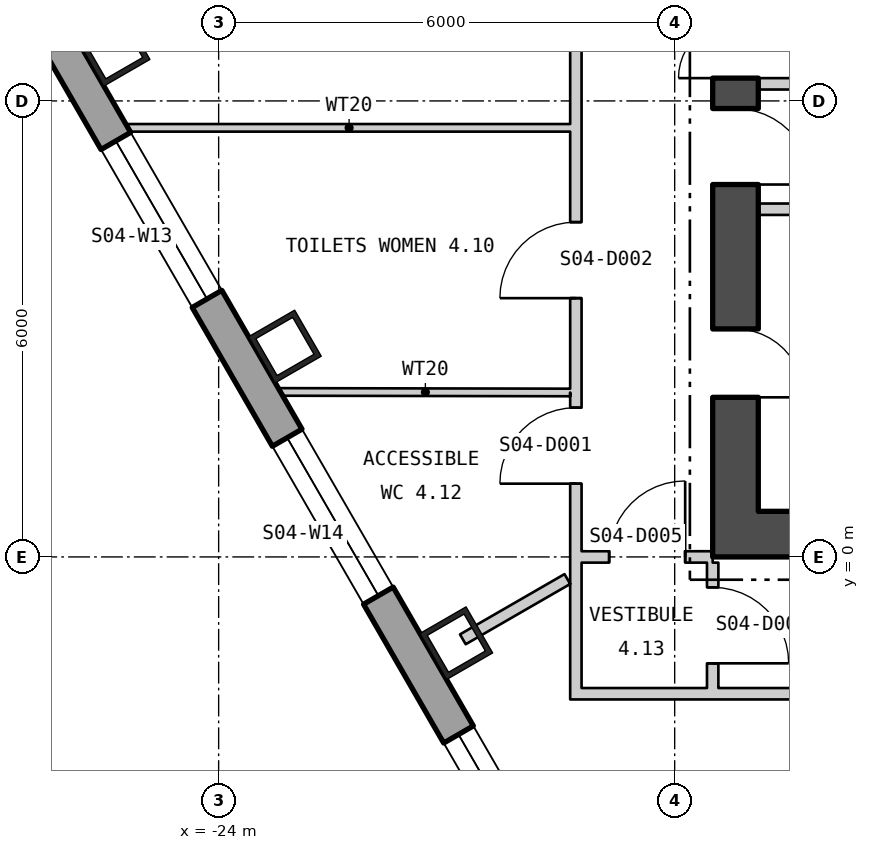
"""IFC4 building model, lengths in metres.
Left out: names, types, materials, properties, quantities, classifications, styles, units other than length and angle.
Written with IfcOpenShell. Run it as: python <this file> out.ifc"""

import sys

from ifc_helpers import new_model, si_unit, direction, frame, frame_2d, origin, origin_2d, place, context, subcontext, project, spatial, polyline, rectangle, hollow_rectangle, outline, extrude, element, fill, save


model = new_model("IFC4")
c1 = context("Model", 3, precision=1e-05, world=origin(), true_north=direction((0.0, 1.0)))
c2 = subcontext(c1, "Body", "Model", "MODEL_VIEW")
j1 = project(units=[si_unit("LENGTHUNIT", "METRE"), si_unit("PLANEANGLEUNIT", "RADIAN")], contexts=[c1])
p1 = place(None, origin())
s1 = spatial("IfcSite", under=j1, at=p1, CompositionType="ELEMENT")
p2 = place(p1, origin())
s2 = spatial("IfcBuilding", under=s1, at=p2, CompositionType="ELEMENT")
p3 = place(p2, frame((0.0, 0.0, 60.3)))
s3 = spatial("IfcBuildingStorey", under=s2, at=p3, CompositionType="ELEMENT", Elevation=60.3)
for number, where, z_axis, x_axis in (
    (1, (-25.382, 6.674, 0.0), (0.0, 0.0, 1.0), (0.5, -0.866, 0.0)),
    (2, (-23.128, 2.769, 0.0), (0.0, 0.0, 1.0), (0.5, -0.866, 0.0)),
    (3, (-20.873, -1.135, 0.0), (0.0, 0.0, 1.0), (0.5, -0.866, 0.0)),
):
    element("IfcColumn", number, at=place(p3, frame(where, z_axis=z_axis, x_axis=x_axis)), inside=s3, PredefinedType="COLUMN", context=c2, shape_type="SweptSolid", body=[
        extrude(hollow_rectangle(XDim=0.7, YDim=0.7, WallThickness=0.07, at=origin_2d()), origin(), (0.0, 0.0, 1.0), 4.5),
    ])
p4 = place(p3, frame((-28.3, 10.579, -0.18), z_axis=(0.0, 0.0, 1.0), x_axis=(0.499999388847, -0.866025756634, 0.0)))
e4 = element("IfcWall", 4, at=p4, inside=s3, PredefinedType="SOLIDWALL", context=c2, shape_type="SweptSolid", body=[
    extrude(outline(polyline([(-0.13, -0.225), (45.88, -0.225), (45.62, 0.225), (0.13, 0.225), (-0.13, -0.225)])), origin(), (0.0, 0.0, 1.0), 4.28),
])
p5 = place(p4, frame((1.425, 0.0, 1.08)))
e5 = element("IfcOpeningElement", 5, at=p5, cuts=e4, PredefinedType="OPENING", context=c2, shape_type="SweptSolid", body=[
    extrude(rectangle(XDim=2.4, YDim=2.6, at=frame_2d((1.2, 1.3))), frame((0.0, 0.235, 0.0), z_axis=(0.0, -1.0, 0.0), x_axis=(1.0, 0.0, 0.0)), (0.0, 0.0, 1.0), 0.47),
])
p6 = place(p4, frame((5.895, 0.0, 1.08)))
e6 = element("IfcOpeningElement", 6, at=p6, cuts=e4, PredefinedType="OPENING", context=c2, shape_type="SweptSolid", body=[
    extrude(rectangle(XDim=2.4, YDim=2.6, at=frame_2d((1.2, 1.3))), frame((0.0, 0.235, 0.0), z_axis=(0.0, -1.0, 0.0), x_axis=(1.0, 0.0, 0.0)), (0.0, 0.0, 1.0), 0.47),
])
p7 = place(p4, frame((10.403, 0.0, 1.08)))
e7 = element("IfcOpeningElement", 7, at=p7, cuts=e4, PredefinedType="OPENING", context=c2, shape_type="SweptSolid", body=[
    extrude(rectangle(XDim=2.4, YDim=2.6, at=frame_2d((1.2, 1.3))), frame((0.0, 0.235, 0.0), z_axis=(0.0, -1.0, 0.0), x_axis=(1.0, 0.0, 0.0)), (0.0, 0.0, 1.0), 0.47),
])
p8 = place(p4, frame((14.912, 0.0, 1.08)))
e8 = element("IfcOpeningElement", 8, at=p8, cuts=e4, PredefinedType="OPENING", context=c2, shape_type="SweptSolid", body=[
    extrude(rectangle(XDim=2.4, YDim=2.6, at=frame_2d((1.2, 1.3))), frame((0.0, 0.235, 0.0), z_axis=(0.0, -1.0, 0.0), x_axis=(1.0, 0.0, 0.0)), (0.0, 0.0, 1.0), 0.47),
])
p9 = place(p4, frame((19.421, 0.0, 1.08)))
e9 = element("IfcOpeningElement", 9, at=p9, cuts=e4, PredefinedType="OPENING", context=c2, shape_type="SweptSolid", body=[
    extrude(rectangle(XDim=2.4, YDim=2.6, at=frame_2d((1.2, 1.3))), frame((0.0, 0.235, 0.0), z_axis=(0.0, -1.0, 0.0), x_axis=(1.0, 0.0, 0.0)), (0.0, 0.0, 1.0), 0.47),
])
p10 = place(p4, frame((23.929, 0.0, 1.08)))
e10 = element("IfcOpeningElement", 10, at=p10, cuts=e4, PredefinedType="OPENING", context=c2, shape_type="SweptSolid", body=[
    extrude(rectangle(XDim=2.4, YDim=2.6, at=frame_2d((1.2, 1.3))), frame((0.0, 0.235, 0.0), z_axis=(0.0, -1.0, 0.0), x_axis=(1.0, 0.0, 0.0)), (0.0, 0.0, 1.0), 0.47),
])
p11 = place(p4, frame((28.438, 0.0, 1.08)))
e11 = element("IfcOpeningElement", 11, at=p11, cuts=e4, PredefinedType="OPENING", context=c2, shape_type="SweptSolid", body=[
    extrude(rectangle(XDim=2.4, YDim=2.6, at=frame_2d((1.2, 1.3))), frame((0.0, 0.235, 0.0), z_axis=(0.0, -1.0, 0.0), x_axis=(1.0, 0.0, 0.0)), (0.0, 0.0, 1.0), 0.47),
])
p12 = place(p4, frame((32.947, 0.0, 1.08)))
e12 = element("IfcOpeningElement", 12, at=p12, cuts=e4, PredefinedType="OPENING", context=c2, shape_type="SweptSolid", body=[
    extrude(rectangle(XDim=2.4, YDim=2.6, at=frame_2d((1.2, 1.3))), frame((0.0, 0.235, 0.0), z_axis=(0.0, -1.0, 0.0), x_axis=(1.0, 0.0, 0.0)), (0.0, 0.0, 1.0), 0.47),
])
p13 = place(p4, frame((37.455, 0.0, 1.08)))
e13 = element("IfcOpeningElement", 13, at=p13, cuts=e4, PredefinedType="OPENING", context=c2, shape_type="SweptSolid", body=[
    extrude(rectangle(XDim=2.4, YDim=2.6, at=frame_2d((1.2, 1.3))), frame((0.0, 0.235, 0.0), z_axis=(0.0, -1.0, 0.0), x_axis=(1.0, 0.0, 0.0)), (0.0, 0.0, 1.0), 0.47),
])
p14 = place(p4, frame((41.925, 0.0, 1.08)))
e14 = element("IfcOpeningElement", 14, at=p14, cuts=e4, PredefinedType="OPENING", context=c2, shape_type="SweptSolid", body=[
    extrude(rectangle(XDim=2.4, YDim=2.6, at=frame_2d((1.2, 1.3))), frame((0.0, 0.235, 0.0), z_axis=(0.0, -1.0, 0.0), x_axis=(1.0, 0.0, 0.0)), (0.0, 0.0, 1.0), 0.47),
])
p15 = place(p3, frame((-17.5, 0.3, 0.0), z_axis=(0.0, 0.0, 1.0), x_axis=(1.0, 0.0, 0.0)))
e15 = element("IfcWall", 15, at=p15, inside=s3, PredefinedType="SHEAR", context=c2, shape_type="SweptSolid", body=[
    extrude(rectangle(XDim=35.0, YDim=0.6, at=frame_2d((17.5, 0.0))), origin(), (0.0, 0.0, 1.0), 4.3),
])
p16 = place(p15, frame((12.0, 0.0, 0.0)))
e16 = element("IfcOpeningElement", 16, at=p16, cuts=e15, PredefinedType="OPENING", context=c2, shape_type="SweptSolid", body=[
    extrude(rectangle(XDim=1.8, YDim=2.4, at=frame_2d((0.9, 1.2))), frame((0.0, 0.31, 0.0), z_axis=(0.0, -1.0, 0.0), x_axis=(1.0, 0.0, 0.0)), (0.0, 0.0, 1.0), 0.62),
])
p17 = place(p15, frame((22.0, 0.0, 0.0)))
e17 = element("IfcOpeningElement", 17, at=p17, cuts=e15, PredefinedType="OPENING", context=c2, shape_type="SweptSolid", body=[
    extrude(rectangle(XDim=1.8, YDim=2.4, at=frame_2d((0.9, 1.2))), frame((0.0, 0.31, 0.0), z_axis=(0.0, -1.0, 0.0), x_axis=(1.0, 0.0, 0.0)), (0.0, 0.0, 1.0), 0.62),
])
p18 = place(p3, frame((-17.2, 0.6, 0.0), z_axis=(0.0, 0.0, 1.0), x_axis=(0.0, 1.0, 0.0)))
e18 = element("IfcWall", 18, at=p18, inside=s3, PredefinedType="SHEAR", context=c2, shape_type="SweptSolid", body=[
    extrude(rectangle(XDim=16.8, YDim=0.6, at=frame_2d((8.4, 0.0))), origin(), (0.0, 0.0, 1.0), 4.3),
])
p19 = place(p18, frame((5.7, 0.0, 0.0)))
e19 = element("IfcOpeningElement", 19, at=p19, cuts=e18, PredefinedType="OPENING", context=c2, shape_type="SweptSolid", body=[
    extrude(rectangle(XDim=1.5, YDim=2.1, at=frame_2d((0.75, 1.05))), frame((0.0, 0.31, 0.0), z_axis=(0.0, -1.0, 0.0), x_axis=(1.0, 0.0, 0.0)), (0.0, 0.0, 1.0), 0.62),
])
p20 = place(p18, frame((1.5, 0.0, 0.0)))
e20 = element("IfcOpeningElement", 20, at=p20, cuts=e18, PredefinedType="OPENING", context=c2, shape_type="SweptSolid", body=[
    extrude(rectangle(XDim=0.9, YDim=2.1, at=frame_2d((0.45, 1.05))), frame((0.0, 0.31, 0.0), z_axis=(0.0, -1.0, 0.0), x_axis=(1.0, 0.0, 0.0)), (0.0, 0.0, 1.0), 0.62),
])
p21 = place(p18, frame((4.3, 0.0, 0.0)))
e21 = element("IfcOpeningElement", 21, at=p21, cuts=e18, PredefinedType="OPENING", context=c2, shape_type="SweptSolid", body=[
    extrude(rectangle(XDim=1.0, YDim=2.1, at=frame_2d((0.5, 1.05))), frame((0.0, 0.31, 0.0), z_axis=(0.0, -1.0, 0.0), x_axis=(1.0, 0.0, 0.0)), (0.0, 0.0, 1.0), 0.62),
])
p22 = place(p18, frame((10.402, 0.0, 0.0)))
e22 = element("IfcOpeningElement", 22, at=p22, cuts=e18, PredefinedType="OPENING", context=c2, shape_type="SweptSolid", body=[
    extrude(rectangle(XDim=0.9, YDim=2.1, at=frame_2d((0.45, 1.05))), frame((0.0, 0.31, 0.0), z_axis=(0.0, -1.0, 0.0), x_axis=(1.0, 0.0, 0.0)), (0.0, 0.0, 1.0), 0.62),
])
p23 = place(p18, frame((15.202, 0.0, 0.0)))
e23 = element("IfcOpeningElement", 23, at=p23, cuts=e18, PredefinedType="OPENING", context=c2, shape_type="SweptSolid", body=[
    extrude(rectangle(XDim=0.9, YDim=2.1, at=frame_2d((0.45, 1.05))), frame((0.0, 0.31, 0.0), z_axis=(0.0, -1.0, 0.0), x_axis=(1.0, 0.0, 0.0)), (0.0, 0.0, 1.0), 0.62),
])
for number, where, z_axis, x_axis in (
    (24, (-16.9, 6.225, 0.0), (0.0, 0.0, 1.0), (1.0, 0.0, 0.0)),
    (25, (-16.9, 4.575, 0.0), (0.0, 0.0, 1.0), (1.0, 0.0, 0.0)),
):
    element("IfcWall", number, at=place(p3, frame(where, z_axis=z_axis, x_axis=x_axis)), inside=s3, PredefinedType="PARTITIONING", context=c2, shape_type="SweptSolid", body=[
        extrude(rectangle(XDim=2.4, YDim=0.15, at=frame_2d((1.2, 0.0))), origin(), (0.0, 0.0, 1.0), 4.3),
    ])
p24 = place(p3, frame((-25.192, 5.646, 0.0), z_axis=(0.0, 0.0, 1.0), x_axis=(1.0, 0.0, 0.0)))
e26 = element("IfcWall", 26, at=p24, inside=s3, PredefinedType="PARTITIONING", context=c2, shape_type="SweptSolid", body=[
    extrude(rectangle(XDim=5.817, YDim=0.1, at=frame_2d((2.909, 0.0))), origin(), (0.0, 0.0, 1.0), 4.3),
])
p25 = place(p3, frame((-23.185, 2.171, 0.0), z_axis=(0.0, 0.0, 1.0), x_axis=(0.999998312223, -0.00183726724, 0.0)))
e27 = element("IfcWall", 27, at=p25, inside=s3, PredefinedType="PARTITIONING", context=c2, shape_type="SweptSolid", body=[
    extrude(rectangle(XDim=3.81, YDim=0.1, at=frame_2d((1.905, 0.0))), origin(), (0.0, 0.0, 1.0), 4.3),
])
p26 = place(p3, frame((-20.787, -1.084, 0.0), z_axis=(0.0, 0.0, 1.0), x_axis=(0.866258995887, 0.499595188173, 0.0)))
e28 = element("IfcWall", 28, at=p26, inside=s3, PredefinedType="PARTITIONING", context=c2, shape_type="SweptSolid", body=[
    extrude(rectangle(XDim=1.587, YDim=0.15, at=frame_2d((0.794, 0.0))), origin(), (0.0, 0.0, 1.0), 4.3),
])
p27 = place(p3, frame((-19.3, -1.875, 0.0), z_axis=(0.0, 0.0, 1.0), x_axis=(0.0, 1.0, 0.0)))
e29 = element("IfcWall", 29, at=p27, inside=s3, PredefinedType="PARTITIONING", context=c2, shape_type="SweptSolid", body=[
    extrude(rectangle(XDim=21.623, YDim=0.15, at=frame_2d((10.812, 0.0))), origin(), (0.0, 0.0, 1.0), 4.3),
])
p28 = place(p27, frame((2.839, 0.0, 0.0)))
e30 = element("IfcOpeningElement", 30, at=p28, cuts=e29, PredefinedType="OPENING", context=c2, shape_type="SweptSolid", body=[
    extrude(rectangle(XDim=1.0, YDim=2.1, at=frame_2d((0.5, 1.05))), frame((0.0, 0.085, 0.0), z_axis=(0.0, -1.0, 0.0), x_axis=(1.0, 0.0, 0.0)), (0.0, 0.0, 1.0), 0.17),
])
p29 = place(p27, frame((5.28, 0.0, 0.0)))
e31 = element("IfcOpeningElement", 31, at=p29, cuts=e29, PredefinedType="OPENING", context=c2, shape_type="SweptSolid", body=[
    extrude(rectangle(XDim=1.0, YDim=2.1, at=frame_2d((0.5, 1.05))), frame((0.0, 0.085, 0.0), z_axis=(0.0, -1.0, 0.0), x_axis=(1.0, 0.0, 0.0)), (0.0, 0.0, 1.0), 0.17),
])
p30 = place(p27, frame((9.239, 0.0, 0.0)))
e32 = element("IfcOpeningElement", 32, at=p30, cuts=e29, PredefinedType="OPENING", context=c2, shape_type="SweptSolid", body=[
    extrude(rectangle(XDim=1.0, YDim=2.1, at=frame_2d((0.5, 1.05))), frame((0.0, 0.085, 0.0), z_axis=(0.0, -1.0, 0.0), x_axis=(1.0, 0.0, 0.0)), (0.0, 0.0, 1.0), 0.17),
])
p31 = place(p27, frame((16.167, 0.0, 0.0)))
e33 = element("IfcOpeningElement", 33, at=p31, cuts=e29, PredefinedType="OPENING", context=c2, shape_type="SweptSolid", body=[
    extrude(rectangle(XDim=1.0, YDim=2.1, at=frame_2d((0.5, 1.05))), frame((0.0, 0.085, 0.0), z_axis=(0.0, -1.0, 0.0), x_axis=(1.0, 0.0, 0.0)), (0.0, 0.0, 1.0), 0.17),
])
p32 = place(p3, frame((-19.225, -1.8, 0.0), z_axis=(0.0, 0.0, 1.0), x_axis=(1.0, 0.0, 0.0)))
e34 = element("IfcWall", 34, at=p32, inside=s3, PredefinedType="PARTITIONING", context=c2, shape_type="SweptSolid", body=[
    extrude(rectangle(XDim=11.37, YDim=0.15, at=frame_2d((5.685, 0.0))), origin(), (0.0, 0.0, 1.0), 4.3),
])
p33 = place(p3, frame((-19.225, 0.0, 0.0), z_axis=(0.0, 0.0, 1.0), x_axis=(1.0, 0.0, 0.0)))
e35 = element("IfcWall", 35, at=p33, inside=s3, PredefinedType="PARTITIONING", context=c2, shape_type="SweptSolid", body=[
    extrude(rectangle(XDim=1.725, YDim=0.15, at=frame_2d((0.863, 0.0))), origin(), (0.0, 0.0, 1.0), 3.61),
])
p34 = place(p33, frame((0.363, 0.0, 0.0)))
e36 = element("IfcOpeningElement", 36, at=p34, cuts=e35, PredefinedType="OPENING", context=c2, shape_type="SweptSolid", body=[
    extrude(rectangle(XDim=1.0, YDim=2.1, at=frame_2d((0.5, 1.05))), frame((0.0, 0.085, 0.0), z_axis=(0.0, -1.0, 0.0), x_axis=(1.0, 0.0, 0.0)), (0.0, 0.0, 1.0), 0.17),
])
p35 = place(p3, frame((-17.5, -1.725, 0.0), z_axis=(0.0, 0.0, 1.0), x_axis=(0.0, 1.0, 0.0)))
e37 = element("IfcWall", 37, at=p35, inside=s3, PredefinedType="PARTITIONING", context=c2, shape_type="SweptSolid", body=[
    extrude(rectangle(XDim=1.65, YDim=0.15, at=frame_2d((0.825, 0.0))), origin(), (0.0, 0.0, 1.0), 4.3),
])
p36 = place(p35, frame((0.325, 0.0, 0.0)))
e38 = element("IfcOpeningElement", 38, at=p36, cuts=e37, PredefinedType="OPENING", context=c2, shape_type="SweptSolid", body=[
    extrude(rectangle(XDim=1.0, YDim=2.1, at=frame_2d((0.5, 1.05))), frame((0.0, 0.085, 0.0), z_axis=(0.0, -1.0, 0.0), x_axis=(1.0, 0.0, 0.0)), (0.0, 0.0, 1.0), 0.17),
])
p37 = place(p6, origin())
e39 = element("IfcWindow", 39, at=p37, inside=s3, PartitioningType="SINGLE_PANEL", PredefinedType="WINDOW", context=c2, shape_type="SweptSolid", body=[
    extrude(rectangle(XDim=2.4, YDim=2.6, at=frame_2d((1.2, 1.3))), frame((0.0, 0.105, 0.0), z_axis=(0.0, -1.0, 0.0), x_axis=(1.0, 0.0, 0.0)), (0.0, 0.0, 1.0), 0.06),
])
fill(e6, e39)
p38 = place(p7, origin())
e40 = element("IfcWindow", 40, at=p38, inside=s3, PartitioningType="SINGLE_PANEL", PredefinedType="WINDOW", context=c2, shape_type="SweptSolid", body=[
    extrude(rectangle(XDim=2.4, YDim=2.6, at=frame_2d((1.2, 1.3))), frame((0.0, 0.105, 0.0), z_axis=(0.0, -1.0, 0.0), x_axis=(1.0, 0.0, 0.0)), (0.0, 0.0, 1.0), 0.06),
])
fill(e7, e40)
p39 = place(p8, origin())
e41 = element("IfcWindow", 41, at=p39, inside=s3, PartitioningType="SINGLE_PANEL", PredefinedType="WINDOW", context=c2, shape_type="SweptSolid", body=[
    extrude(rectangle(XDim=2.4, YDim=2.6, at=frame_2d((1.2, 1.3))), frame((0.0, 0.105, 0.0), z_axis=(0.0, -1.0, 0.0), x_axis=(1.0, 0.0, 0.0)), (0.0, 0.0, 1.0), 0.06),
])
fill(e8, e41)
p40 = place(p19, origin())
e42 = element("IfcDoor", 42, at=p40, inside=s3, OperationType="DOUBLE_DOOR_SINGLE_SWING", PredefinedType="DOOR", context=c2, shape_type="SweptSolid", body=[
    extrude(rectangle(XDim=1.5, YDim=2.1, at=frame_2d((0.75, 1.05))), frame((0.0, 0.025, 0.0), z_axis=(0.0, -1.0, 0.0), x_axis=(1.0, 0.0, 0.0)), (0.0, 0.0, 1.0), 0.05),
])
fill(e19, e42)
p41 = place(p20, origin())
e43 = element("IfcDoor", 43, at=p41, inside=s3, OperationType="SINGLE_SWING_LEFT", PredefinedType="DOOR", context=c2, shape_type="SweptSolid", body=[
    extrude(rectangle(XDim=0.9, YDim=2.1, at=frame_2d((0.45, 1.05))), frame((0.0, 0.025, 0.0), z_axis=(0.0, -1.0, 0.0), x_axis=(1.0, 0.0, 0.0)), (0.0, 0.0, 1.0), 0.05),
])
fill(e20, e43)
p42 = place(p21, origin())
e44 = element("IfcDoor", 44, at=p42, inside=s3, OperationType="SINGLE_SWING_LEFT", PredefinedType="DOOR", context=c2, shape_type="SweptSolid", body=[
    extrude(rectangle(XDim=1.0, YDim=2.1, at=frame_2d((0.5, 1.05))), frame((0.0, 0.025, 0.0), z_axis=(0.0, -1.0, 0.0), x_axis=(1.0, 0.0, 0.0)), (0.0, 0.0, 1.0), 0.05),
])
fill(e21, e44)
p43 = place(p28, origin())
e45 = element("IfcDoor", 45, at=p43, inside=s3, OperationType="SINGLE_SWING_RIGHT", PredefinedType="DOOR", context=c2, shape_type="SweptSolid", body=[
    extrude(rectangle(XDim=1.0, YDim=2.1, at=frame_2d((0.5, 1.05))), frame((0.0, 0.025, 0.0), z_axis=(0.0, -1.0, 0.0), x_axis=(1.0, 0.0, 0.0)), (0.0, 0.0, 1.0), 0.05),
])
fill(e30, e45)
p44 = place(p29, origin())
e46 = element("IfcDoor", 46, at=p44, inside=s3, OperationType="SINGLE_SWING_RIGHT", PredefinedType="DOOR", context=c2, shape_type="SweptSolid", body=[
    extrude(rectangle(XDim=1.0, YDim=2.1, at=frame_2d((0.5, 1.05))), frame((0.0, 0.025, 0.0), z_axis=(0.0, -1.0, 0.0), x_axis=(1.0, 0.0, 0.0)), (0.0, 0.0, 1.0), 0.05),
])
fill(e31, e46)
p45 = place(p34, origin())
e47 = element("IfcDoor", 47, at=p45, inside=s3, OperationType="SINGLE_SWING_LEFT", PredefinedType="DOOR", context=c2, shape_type="SweptSolid", body=[
    extrude(rectangle(XDim=1.0, YDim=2.1, at=frame_2d((0.5, 1.05))), frame((0.0, 0.025, 0.0), z_axis=(0.0, -1.0, 0.0), x_axis=(1.0, 0.0, 0.0)), (0.0, 0.0, 1.0), 0.05),
])
fill(e36, e47)
p46 = place(p36, origin())
e48 = element("IfcDoor", 48, at=p46, inside=s3, OperationType="SINGLE_SWING_LEFT", PredefinedType="DOOR", context=c2, shape_type="SweptSolid", body=[
    extrude(rectangle(XDim=1.0, YDim=2.1, at=frame_2d((0.5, 1.05))), frame((0.0, 0.025, 0.0), z_axis=(0.0, -1.0, 0.0), x_axis=(1.0, 0.0, 0.0)), (0.0, 0.0, 1.0), 0.05),
])
fill(e38, e48)
save(model, sys.argv[1])
